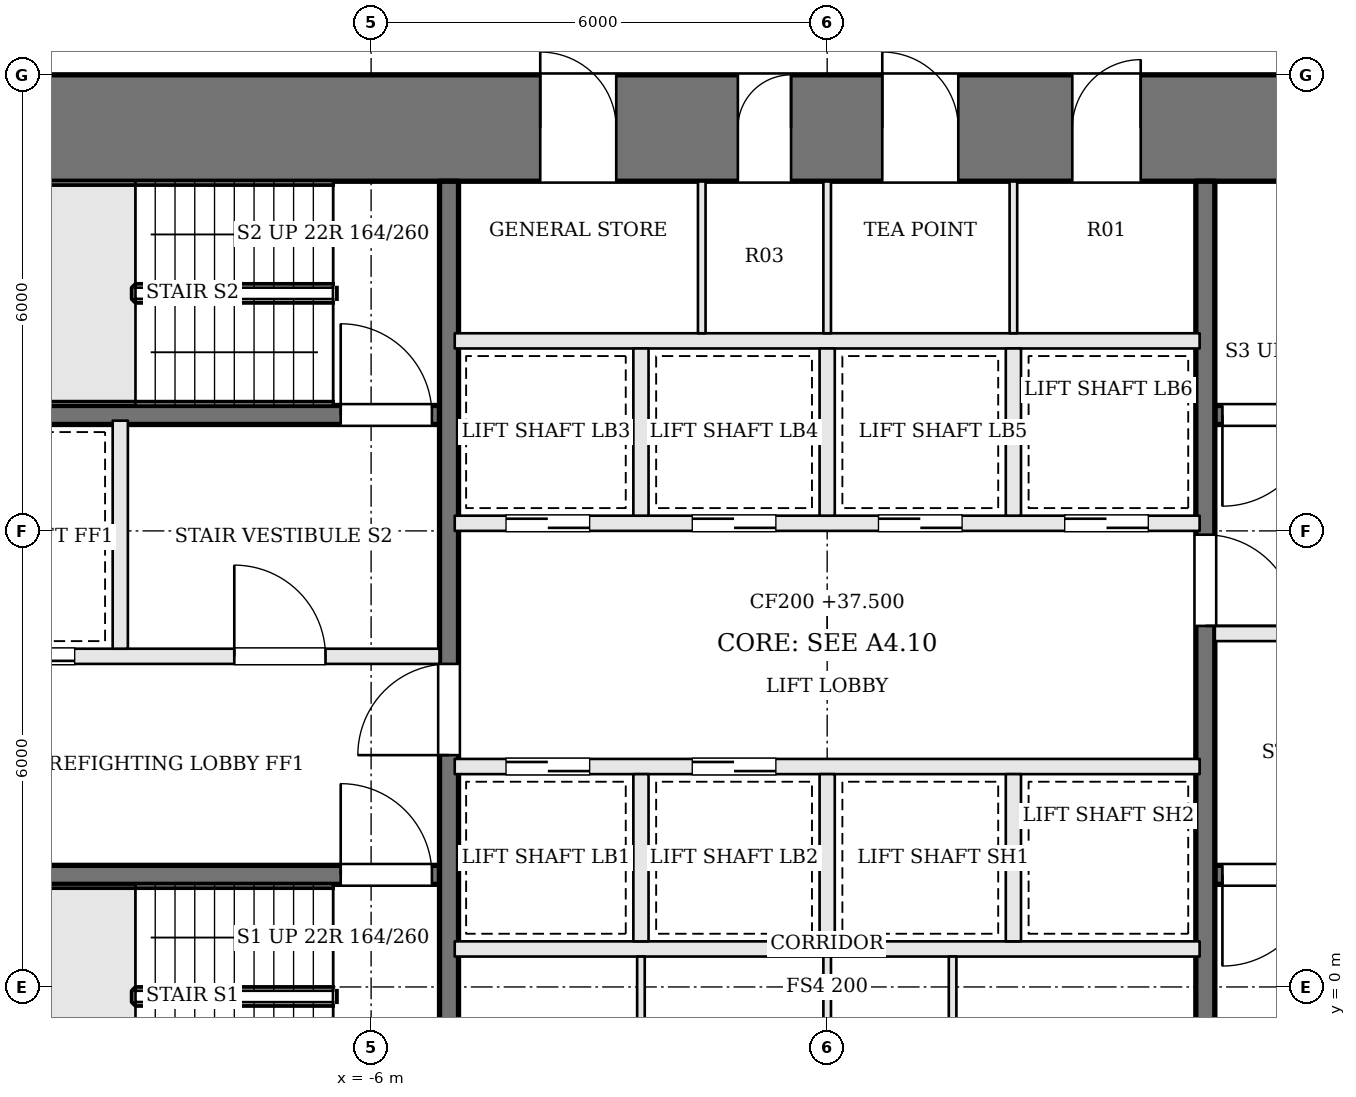
"""IFC4 building model, lengths in metres.
Left out: names, types, materials, properties, quantities, classifications, styles, units other than length and angle.
Written with IfcOpenShell. Run it as: python <this file> out.ifc"""

import sys

from ifc_helpers import new_model, si_unit, direction, frame, frame_2d, origin, place, context, subcontext, project, spatial, rectangle, extrude, element, fill, save


model = new_model("IFC4")
c1 = context("Model", 3, precision=1e-05, world=origin(), true_north=direction((0.0, 1.0)))
c2 = subcontext(c1, "Body", "Model", "MODEL_VIEW")
j1 = project(units=[si_unit("LENGTHUNIT", "METRE"), si_unit("PLANEANGLEUNIT", "RADIAN")], contexts=[c1])
p1 = place(None, origin())
s1 = spatial("IfcSite", under=j1, at=p1, CompositionType="ELEMENT")
p2 = place(p1, origin())
s2 = spatial("IfcBuilding", under=s1, at=p2, CompositionType="ELEMENT")
p3 = place(p2, frame((0.0, 0.0, 37.5)))
s3 = spatial("IfcBuildingStorey", under=s2, at=p3, CompositionType="ELEMENT", Elevation=37.5)
p4 = place(p3, frame((-13.0, 11.3, 0.0), z_axis=(0.0, 0.0, 1.0), x_axis=(1.0, 0.0, 0.0)))
e1 = element("IfcWall", 1, at=p4, inside=s3, PredefinedType="SHEAR", context=c2, shape_type="SweptSolid", body=[
    extrude(rectangle(XDim=26.0, YDim=1.4, at=frame_2d((13.0, 0.0))), origin(), (0.0, 0.0, 1.0), 3.6),
])
p5 = place(p4, frame((9.225, 0.0, 0.0)))
e2 = element("IfcOpeningElement", 2, at=p5, cuts=e1, PredefinedType="OPENING", context=c2, shape_type="SweptSolid", body=[
    extrude(rectangle(XDim=1.0, YDim=2.1, at=frame_2d((0.5, 1.05))), frame((0.0, 0.71, 0.0), z_axis=(0.0, -1.0, 0.0), x_axis=(1.0, 0.0, 0.0)), (0.0, 0.0, 1.0), 1.42),
])
p6 = place(p4, frame((11.825, 0.0, 0.0)))
e3 = element("IfcOpeningElement", 3, at=p6, cuts=e1, PredefinedType="OPENING", context=c2, shape_type="SweptSolid", body=[
    extrude(rectangle(XDim=0.7, YDim=2.1, at=frame_2d((0.35, 1.05))), frame((0.0, 0.71, 0.0), z_axis=(0.0, -1.0, 0.0), x_axis=(1.0, 0.0, 0.0)), (0.0, 0.0, 1.0), 1.42),
])
p7 = place(p4, frame((13.725, 0.0, 0.0)))
e4 = element("IfcOpeningElement", 4, at=p7, cuts=e1, PredefinedType="OPENING", context=c2, shape_type="SweptSolid", body=[
    extrude(rectangle(XDim=1.0, YDim=2.1, at=frame_2d((0.5, 1.05))), frame((0.0, 0.71, 0.0), z_axis=(0.0, -1.0, 0.0), x_axis=(1.0, 0.0, 0.0)), (0.0, 0.0, 1.0), 1.42),
])
p8 = place(p4, frame((16.225, 0.0, 0.0)))
e5 = element("IfcOpeningElement", 5, at=p8, cuts=e1, PredefinedType="OPENING", context=c2, shape_type="SweptSolid", body=[
    extrude(rectangle(XDim=0.9, YDim=2.1, at=frame_2d((0.45, 1.05))), frame((0.0, 0.71, 0.0), z_axis=(0.0, -1.0, 0.0), x_axis=(1.0, 0.0, 0.0)), (0.0, 0.0, 1.0), 1.42),
])
p9 = place(p3, frame((-11.6, 1.475, 0.0), z_axis=(0.0, 0.0, 1.0), x_axis=(1.0, 0.0, 0.0)))
e6 = element("IfcWall", 6, at=p9, inside=s3, PredefinedType="SOLIDWALL", context=c2, shape_type="SweptSolid", body=[
    extrude(rectangle(XDim=6.5, YDim=0.25, at=frame_2d((3.25, 0.0))), origin(), (0.0, 0.0, 1.0), 3.4),
])
p10 = place(p9, frame((5.2, 0.0, 0.0)))
e7 = element("IfcOpeningElement", 7, at=p10, cuts=e6, PredefinedType="OPENING", context=c2, shape_type="SweptSolid", body=[
    extrude(rectangle(XDim=1.2, YDim=2.1, at=frame_2d((0.6, 1.05))), frame((0.0, 0.135, 0.0), z_axis=(0.0, -1.0, 0.0), x_axis=(1.0, 0.0, 0.0)), (0.0, 0.0, 1.0), 0.27),
])
p11 = place(p3, frame((11.6, 7.525, 0.0), z_axis=(0.0, 0.0, 1.0), x_axis=(-1.0, 0.0, 0.0)))
e8 = element("IfcWall", 8, at=p11, inside=s3, PredefinedType="SOLIDWALL", context=c2, shape_type="SweptSolid", body=[
    extrude(rectangle(XDim=6.5, YDim=0.25, at=frame_2d((3.25, 0.0))), origin(), (0.0, 0.0, 1.0), 3.4),
])
p12 = place(p11, frame((5.2, 0.0, 0.0)))
e9 = element("IfcOpeningElement", 9, at=p12, cuts=e8, PredefinedType="OPENING", context=c2, shape_type="SweptSolid", body=[
    extrude(rectangle(XDim=1.2, YDim=2.1, at=frame_2d((0.6, 1.05))), frame((0.0, 0.135, 0.0), z_axis=(0.0, -1.0, 0.0), x_axis=(1.0, 0.0, 0.0)), (0.0, 0.0, 1.0), 0.27),
])
p13 = place(p3, frame((-11.6, 4.35, 0.0), z_axis=(0.0, 0.0, 1.0), x_axis=(1.0, 0.0, 0.0)))
e10 = element("IfcWall", 10, at=p13, inside=s3, PredefinedType="SOLIDWALL", context=c2, shape_type="SweptSolid", body=[
    extrude(rectangle(XDim=6.5, YDim=0.2, at=frame_2d((3.25, 0.0))), origin(), (0.0, 0.0, 1.0), 3.4),
])
p14 = place(p13, frame((3.8, 0.0, 0.0)))
e11 = element("IfcOpeningElement", 11, at=p14, cuts=e10, PredefinedType="OPENING", context=c2, shape_type="SweptSolid", body=[
    extrude(rectangle(XDim=1.2, YDim=2.1, at=frame_2d((0.6, 1.05))), frame((0.0, 0.11, 0.0), z_axis=(0.0, -1.0, 0.0), x_axis=(1.0, 0.0, 0.0)), (0.0, 0.0, 1.0), 0.22),
])
p15 = place(p13, frame((0.5, 0.0, 0.0)))
e12 = element("IfcOpeningElement", 12, at=p15, cuts=e10, PredefinedType="OPENING", context=c2, shape_type="SweptSolid", body=[
    extrude(rectangle(XDim=1.2, YDim=2.1, at=frame_2d((0.6, 1.05))), frame((0.0, 0.11, 0.0), z_axis=(0.0, -1.0, 0.0), x_axis=(1.0, 0.0, 0.0)), (0.0, 0.0, 1.0), 0.22),
])
p16 = place(p3, frame((11.6, 4.65, 0.0), z_axis=(0.0, 0.0, 1.0), x_axis=(-1.0, 0.0, 0.0)))
e13 = element("IfcWall", 13, at=p16, inside=s3, PredefinedType="SOLIDWALL", context=c2, shape_type="SweptSolid", body=[
    extrude(rectangle(XDim=6.5, YDim=0.2, at=frame_2d((3.25, 0.0))), origin(), (0.0, 0.0, 1.0), 3.4),
])
p17 = place(p16, frame((3.8, 0.0, 0.0)))
e14 = element("IfcOpeningElement", 14, at=p17, cuts=e13, PredefinedType="OPENING", context=c2, shape_type="SweptSolid", body=[
    extrude(rectangle(XDim=1.2, YDim=2.1, at=frame_2d((0.6, 1.05))), frame((0.0, 0.11, 0.0), z_axis=(0.0, -1.0, 0.0), x_axis=(1.0, 0.0, 0.0)), (0.0, 0.0, 1.0), 0.22),
])
p18 = place(p16, frame((0.5, 0.0, 0.0)))
e15 = element("IfcOpeningElement", 15, at=p18, cuts=e13, PredefinedType="OPENING", context=c2, shape_type="SweptSolid", body=[
    extrude(rectangle(XDim=1.2, YDim=2.1, at=frame_2d((0.6, 1.05))), frame((0.0, 0.11, 0.0), z_axis=(0.0, -1.0, 0.0), x_axis=(1.0, 0.0, 0.0)), (0.0, 0.0, 1.0), 0.22),
])
p19 = place(p3, frame((-11.6, 7.525, 0.0), z_axis=(0.0, 0.0, 1.0), x_axis=(1.0, 0.0, 0.0)))
e16 = element("IfcWall", 16, at=p19, inside=s3, PredefinedType="SOLIDWALL", context=c2, shape_type="SweptSolid", body=[
    extrude(rectangle(XDim=6.5, YDim=0.25, at=frame_2d((3.25, 0.0))), origin(), (0.0, 0.0, 1.0), 3.4),
])
p20 = place(p19, frame((5.2, 0.0, 0.0)))
e17 = element("IfcOpeningElement", 17, at=p20, cuts=e16, PredefinedType="OPENING", context=c2, shape_type="SweptSolid", body=[
    extrude(rectangle(XDim=1.2, YDim=2.1, at=frame_2d((0.6, 1.05))), frame((0.0, 0.135, 0.0), z_axis=(0.0, -1.0, 0.0), x_axis=(1.0, 0.0, 0.0)), (0.0, 0.0, 1.0), 0.27),
])
p21 = place(p3, frame((11.6, 1.475, 0.0), z_axis=(0.0, 0.0, 1.0), x_axis=(-1.0, 0.0, 0.0)))
e18 = element("IfcWall", 18, at=p21, inside=s3, PredefinedType="SOLIDWALL", context=c2, shape_type="SweptSolid", body=[
    extrude(rectangle(XDim=6.5, YDim=0.25, at=frame_2d((3.25, 0.0))), origin(), (0.0, 0.0, 1.0), 3.4),
])
p22 = place(p21, frame((5.2, 0.0, 0.0)))
e19 = element("IfcOpeningElement", 19, at=p22, cuts=e18, PredefinedType="OPENING", context=c2, shape_type="SweptSolid", body=[
    extrude(rectangle(XDim=1.2, YDim=2.1, at=frame_2d((0.6, 1.05))), frame((0.0, 0.135, 0.0), z_axis=(0.0, -1.0, 0.0), x_axis=(1.0, 0.0, 0.0)), (0.0, 0.0, 1.0), 0.27),
])
p23 = place(p3, frame((-9.3, 4.45, 0.0), z_axis=(0.0, 0.0, 1.0), x_axis=(0.0, 1.0, 0.0)))
e20 = element("IfcWall", 20, at=p23, inside=s3, PredefinedType="SOLIDWALL", context=c2, shape_type="SweptSolid", body=[
    extrude(rectangle(XDim=3.0, YDim=0.2, at=frame_2d((1.5, 0.0))), origin(), (0.0, 0.0, 1.0), 3.4),
])
p24 = place(p3, frame((-4.975, -1.6, 0.0), z_axis=(0.0, 0.0, 1.0), x_axis=(0.0, 1.0, 0.0)))
e21 = element("IfcWall", 21, at=p24, inside=s3, PredefinedType="SOLIDWALL", context=c2, shape_type="SweptSolid", body=[
    extrude(rectangle(XDim=12.2, YDim=0.25, at=frame_2d((6.1, 0.0))), origin(), (0.0, 0.0, 1.0), 3.4),
])
p25 = place(p24, frame((4.65, 0.0, 0.0)))
e22 = element("IfcOpeningElement", 22, at=p25, cuts=e21, PredefinedType="OPENING", context=c2, shape_type="SweptSolid", body=[
    extrude(rectangle(XDim=1.2, YDim=2.1, at=frame_2d((0.6, 1.05))), frame((0.0, 0.135, 0.0), z_axis=(0.0, -1.0, 0.0), x_axis=(1.0, 0.0, 0.0)), (0.0, 0.0, 1.0), 0.27),
])
p26 = place(p3, frame((4.975, 10.6, 0.0), z_axis=(0.0, 0.0, 1.0), x_axis=(0.0, -1.0, 0.0)))
e23 = element("IfcWall", 23, at=p26, inside=s3, PredefinedType="SOLIDWALL", context=c2, shape_type="SweptSolid", body=[
    extrude(rectangle(XDim=12.2, YDim=0.25, at=frame_2d((6.1, 0.0))), origin(), (0.0, 0.0, 1.0), 3.4),
])
p27 = place(p26, frame((4.65, 0.0, 0.0)))
e24 = element("IfcOpeningElement", 24, at=p27, cuts=e23, PredefinedType="OPENING", context=c2, shape_type="SweptSolid", body=[
    extrude(rectangle(XDim=1.2, YDim=2.1, at=frame_2d((0.6, 1.05))), frame((0.0, 0.135, 0.0), z_axis=(0.0, -1.0, 0.0), x_axis=(1.0, 0.0, 0.0)), (0.0, 0.0, 1.0), 0.27),
])
p28 = place(p3, frame((-4.9, 0.5, 0.0), z_axis=(0.0, 0.0, 1.0), x_axis=(1.0, 0.0, 0.0)))
e25 = element("IfcWall", 25, at=p28, inside=s3, PredefinedType="SOLIDWALL", context=c2, shape_type="SweptSolid", body=[
    extrude(rectangle(XDim=9.8, YDim=0.2, at=frame_2d((4.9, 0.0))), origin(), (0.0, 0.0, 1.0), 3.4),
])
p29 = place(p3, frame((-4.9, 2.9, 0.0), z_axis=(0.0, 0.0, 1.0), x_axis=(1.0, 0.0, 0.0)))
e26 = element("IfcWall", 26, at=p29, inside=s3, PredefinedType="SOLIDWALL", context=c2, shape_type="SweptSolid", body=[
    extrude(rectangle(XDim=9.8, YDim=0.2, at=frame_2d((4.9, 0.0))), origin(), (0.0, 0.0, 1.0), 3.4),
])
p30 = place(p29, frame((0.675, 0.0, 0.0)))
e27 = element("IfcOpeningElement", 27, at=p30, cuts=e26, PredefinedType="OPENING", context=c2, shape_type="SweptSolid", body=[
    extrude(rectangle(XDim=1.1, YDim=2.1, at=frame_2d((0.55, 1.05))), frame((0.0, 0.11, 0.0), z_axis=(0.0, -1.0, 0.0), x_axis=(1.0, 0.0, 0.0)), (0.0, 0.0, 1.0), 0.22),
])
p31 = place(p29, frame((3.125, 0.0, 0.0)))
e28 = element("IfcOpeningElement", 28, at=p31, cuts=e26, PredefinedType="OPENING", context=c2, shape_type="SweptSolid", body=[
    extrude(rectangle(XDim=1.1, YDim=2.1, at=frame_2d((0.55, 1.05))), frame((0.0, 0.11, 0.0), z_axis=(0.0, -1.0, 0.0), x_axis=(1.0, 0.0, 0.0)), (0.0, 0.0, 1.0), 0.22),
])
p32 = place(p3, frame((-4.9, 6.1, 0.0), z_axis=(0.0, 0.0, 1.0), x_axis=(1.0, 0.0, 0.0)))
e29 = element("IfcWall", 29, at=p32, inside=s3, PredefinedType="SOLIDWALL", context=c2, shape_type="SweptSolid", body=[
    extrude(rectangle(XDim=9.8, YDim=0.2, at=frame_2d((4.9, 0.0))), origin(), (0.0, 0.0, 1.0), 3.4),
])
p33 = place(p32, frame((0.675, 0.0, 0.0)))
e30 = element("IfcOpeningElement", 30, at=p33, cuts=e29, PredefinedType="OPENING", context=c2, shape_type="SweptSolid", body=[
    extrude(rectangle(XDim=1.1, YDim=2.1, at=frame_2d((0.55, 1.05))), frame((0.0, 0.11, 0.0), z_axis=(0.0, -1.0, 0.0), x_axis=(1.0, 0.0, 0.0)), (0.0, 0.0, 1.0), 0.22),
])
p34 = place(p32, frame((3.125, 0.0, 0.0)))
e31 = element("IfcOpeningElement", 31, at=p34, cuts=e29, PredefinedType="OPENING", context=c2, shape_type="SweptSolid", body=[
    extrude(rectangle(XDim=1.1, YDim=2.1, at=frame_2d((0.55, 1.05))), frame((0.0, 0.11, 0.0), z_axis=(0.0, -1.0, 0.0), x_axis=(1.0, 0.0, 0.0)), (0.0, 0.0, 1.0), 0.22),
])
p35 = place(p32, frame((5.575, 0.0, 0.0)))
e32 = element("IfcOpeningElement", 32, at=p35, cuts=e29, PredefinedType="OPENING", context=c2, shape_type="SweptSolid", body=[
    extrude(rectangle(XDim=1.1, YDim=2.1, at=frame_2d((0.55, 1.05))), frame((0.0, 0.11, 0.0), z_axis=(0.0, -1.0, 0.0), x_axis=(1.0, 0.0, 0.0)), (0.0, 0.0, 1.0), 0.22),
])
p36 = place(p32, frame((8.025, 0.0, 0.0)))
e33 = element("IfcOpeningElement", 33, at=p36, cuts=e29, PredefinedType="OPENING", context=c2, shape_type="SweptSolid", body=[
    extrude(rectangle(XDim=1.1, YDim=2.1, at=frame_2d((0.55, 1.05))), frame((0.0, 0.11, 0.0), z_axis=(0.0, -1.0, 0.0), x_axis=(1.0, 0.0, 0.0)), (0.0, 0.0, 1.0), 0.22),
])
p37 = place(p3, frame((-4.9, 8.5, 0.0), z_axis=(0.0, 0.0, 1.0), x_axis=(1.0, 0.0, 0.0)))
e34 = element("IfcWall", 34, at=p37, inside=s3, PredefinedType="SOLIDWALL", context=c2, shape_type="SweptSolid", body=[
    extrude(rectangle(XDim=9.8, YDim=0.2, at=frame_2d((4.9, 0.0))), origin(), (0.0, 0.0, 1.0), 3.4),
])
for number, where, z_axis, x_axis in (
    (35, (-2.45, 0.6, 0.0), (0.0, 0.0, 1.0), (0.0, 1.0, 0.0)),
    (36, (0.0, 0.6, 0.0), (0.0, 0.0, 1.0), (0.0, 1.0, 0.0)),
    (37, (2.45, 0.6, 0.0), (0.0, 0.0, 1.0), (0.0, 1.0, 0.0)),
    (38, (-2.45, 6.2, 0.0), (0.0, 0.0, 1.0), (0.0, 1.0, 0.0)),
    (39, (0.0, 6.2, 0.0), (0.0, 0.0, 1.0), (0.0, 1.0, 0.0)),
    (40, (2.45, 6.2, 0.0), (0.0, 0.0, 1.0), (0.0, 1.0, 0.0)),
):
    element("IfcWall", number, at=place(p3, frame(where, z_axis=z_axis, x_axis=x_axis)), inside=s3, PredefinedType="SOLIDWALL", context=c2, shape_type="SweptSolid", body=[
        extrude(rectangle(XDim=2.2, YDim=0.2, at=frame_2d((1.1, 0.0))), origin(), (0.0, 0.0, 1.0), 3.4),
    ])
for number, where, z_axis, x_axis in (
    (41, (-2.45, -1.6, 0.0), (0.0, 0.0, 1.0), (0.0, 1.0, 0.0)),
    (42, (0.0, -1.6, 0.0), (0.0, 0.0, 1.0), (0.0, 1.0, 0.0)),
    (43, (1.65, -1.6, 0.0), (0.0, 0.0, 1.0), (0.0, 1.0, 0.0)),
    (44, (-1.65, 8.6, 0.0), (0.0, 0.0, 1.0), (0.0, 1.0, 0.0)),
    (45, (0.0, 8.6, 0.0), (0.0, 0.0, 1.0), (0.0, 1.0, 0.0)),
    (46, (2.45, 8.6, 0.0), (0.0, 0.0, 1.0), (0.0, 1.0, 0.0)),
):
    element("IfcWall", number, at=place(p3, frame(where, z_axis=z_axis, x_axis=x_axis)), inside=s3, PredefinedType="PARTITIONING", context=c2, shape_type="SweptSolid", body=[
        extrude(rectangle(XDim=2.0, YDim=0.1, at=frame_2d((1.0, 0.0))), origin(), (0.0, 0.0, 1.0), 3.4),
    ])
p38 = place(p25, origin())
e47 = element("IfcDoor", 47, at=p38, inside=s3, OperationType="SINGLE_SWING_LEFT", PredefinedType="DOOR", context=c2, shape_type="SweptSolid", body=[
    extrude(rectangle(XDim=1.2, YDim=2.1, at=frame_2d((0.6, 1.05))), frame((0.0, 0.025, 0.0), z_axis=(0.0, -1.0, 0.0), x_axis=(1.0, 0.0, 0.0)), (0.0, 0.0, 1.0), 0.05),
])
fill(e22, e47)
p39 = place(p27, origin())
e48 = element("IfcDoor", 48, at=p39, inside=s3, OperationType="SINGLE_SWING_RIGHT", PredefinedType="DOOR", context=c2, shape_type="SweptSolid", body=[
    extrude(rectangle(XDim=1.2, YDim=2.1, at=frame_2d((0.6, 1.05))), frame((0.0, 0.025, 0.0), z_axis=(0.0, -1.0, 0.0), x_axis=(1.0, 0.0, 0.0)), (0.0, 0.0, 1.0), 0.05),
])
fill(e24, e48)
p40 = place(p14, origin())
e49 = element("IfcDoor", 49, at=p40, inside=s3, OperationType="SINGLE_SWING_LEFT", PredefinedType="DOOR", context=c2, shape_type="SweptSolid", body=[
    extrude(rectangle(XDim=1.2, YDim=2.1, at=frame_2d((0.6, 1.05))), frame((0.0, 0.025, 0.0), z_axis=(0.0, -1.0, 0.0), x_axis=(1.0, 0.0, 0.0)), (0.0, 0.0, 1.0), 0.05),
])
fill(e11, e49)
p41 = place(p10, origin())
e50 = element("IfcDoor", 50, at=p41, inside=s3, OperationType="SINGLE_SWING_LEFT", PredefinedType="DOOR", context=c2, shape_type="SweptSolid", body=[
    extrude(rectangle(XDim=1.2, YDim=2.1, at=frame_2d((0.6, 1.05))), frame((0.0, 0.025, 0.0), z_axis=(0.0, -1.0, 0.0), x_axis=(1.0, 0.0, 0.0)), (0.0, 0.0, 1.0), 0.05),
])
fill(e7, e50)
p42 = place(p12, origin())
e51 = element("IfcDoor", 51, at=p42, inside=s3, OperationType="SINGLE_SWING_RIGHT", PredefinedType="DOOR", context=c2, shape_type="SweptSolid", body=[
    extrude(rectangle(XDim=1.2, YDim=2.1, at=frame_2d((0.6, 1.05))), frame((0.0, 0.025, 0.0), z_axis=(0.0, -1.0, 0.0), x_axis=(1.0, 0.0, 0.0)), (0.0, 0.0, 1.0), 0.05),
])
fill(e9, e51)
p43 = place(p20, origin())
e52 = element("IfcDoor", 52, at=p43, inside=s3, OperationType="SINGLE_SWING_LEFT", PredefinedType="DOOR", context=c2, shape_type="SweptSolid", body=[
    extrude(rectangle(XDim=1.2, YDim=2.1, at=frame_2d((0.6, 1.05))), frame((0.0, 0.025, 0.0), z_axis=(0.0, -1.0, 0.0), x_axis=(1.0, 0.0, 0.0)), (0.0, 0.0, 1.0), 0.05),
])
fill(e17, e52)
p44 = place(p22, origin())
e53 = element("IfcDoor", 53, at=p44, inside=s3, OperationType="SINGLE_SWING_RIGHT", PredefinedType="DOOR", context=c2, shape_type="SweptSolid", body=[
    extrude(rectangle(XDim=1.2, YDim=2.1, at=frame_2d((0.6, 1.05))), frame((0.0, 0.025, 0.0), z_axis=(0.0, -1.0, 0.0), x_axis=(1.0, 0.0, 0.0)), (0.0, 0.0, 1.0), 0.05),
])
fill(e19, e53)
p45 = place(p15, origin())
e54 = element("IfcDoor", 54, at=p45, inside=s3, OperationType="SLIDING_TO_RIGHT", PredefinedType="DOOR", context=c2, shape_type="SweptSolid", body=[
    extrude(rectangle(XDim=1.2, YDim=2.1, at=frame_2d((0.6, 1.05))), frame((0.0, 0.025, 0.0), z_axis=(0.0, -1.0, 0.0), x_axis=(1.0, 0.0, 0.0)), (0.0, 0.0, 1.0), 0.05),
])
fill(e12, e54)
p46 = place(p30, origin())
e55 = element("IfcDoor", 55, at=p46, inside=s3, OperationType="SLIDING_TO_RIGHT", PredefinedType="DOOR", context=c2, shape_type="SweptSolid", body=[
    extrude(rectangle(XDim=1.1, YDim=2.1, at=frame_2d((0.55, 1.05))), frame((0.0, 0.025, 0.0), z_axis=(0.0, -1.0, 0.0), x_axis=(1.0, 0.0, 0.0)), (0.0, 0.0, 1.0), 0.05),
])
fill(e27, e55)
p47 = place(p31, origin())
e56 = element("IfcDoor", 56, at=p47, inside=s3, OperationType="SLIDING_TO_LEFT", PredefinedType="DOOR", context=c2, shape_type="SweptSolid", body=[
    extrude(rectangle(XDim=1.1, YDim=2.1, at=frame_2d((0.55, 1.05))), frame((0.0, 0.025, 0.0), z_axis=(0.0, -1.0, 0.0), x_axis=(1.0, 0.0, 0.0)), (0.0, 0.0, 1.0), 0.05),
])
fill(e28, e56)
p48 = place(p33, origin())
e57 = element("IfcDoor", 57, at=p48, inside=s3, OperationType="SLIDING_TO_RIGHT", PredefinedType="DOOR", context=c2, shape_type="SweptSolid", body=[
    extrude(rectangle(XDim=1.1, YDim=2.1, at=frame_2d((0.55, 1.05))), frame((0.0, 0.025, 0.0), z_axis=(0.0, -1.0, 0.0), x_axis=(1.0, 0.0, 0.0)), (0.0, 0.0, 1.0), 0.05),
])
fill(e30, e57)
p49 = place(p34, origin())
e58 = element("IfcDoor", 58, at=p49, inside=s3, OperationType="SLIDING_TO_LEFT", PredefinedType="DOOR", context=c2, shape_type="SweptSolid", body=[
    extrude(rectangle(XDim=1.1, YDim=2.1, at=frame_2d((0.55, 1.05))), frame((0.0, 0.025, 0.0), z_axis=(0.0, -1.0, 0.0), x_axis=(1.0, 0.0, 0.0)), (0.0, 0.0, 1.0), 0.05),
])
fill(e31, e58)
p50 = place(p35, origin())
e59 = element("IfcDoor", 59, at=p50, inside=s3, OperationType="SLIDING_TO_RIGHT", PredefinedType="DOOR", context=c2, shape_type="SweptSolid", body=[
    extrude(rectangle(XDim=1.1, YDim=2.1, at=frame_2d((0.55, 1.05))), frame((0.0, 0.025, 0.0), z_axis=(0.0, -1.0, 0.0), x_axis=(1.0, 0.0, 0.0)), (0.0, 0.0, 1.0), 0.05),
])
fill(e32, e59)
p51 = place(p36, origin())
e60 = element("IfcDoor", 60, at=p51, inside=s3, OperationType="SLIDING_TO_LEFT", PredefinedType="DOOR", context=c2, shape_type="SweptSolid", body=[
    extrude(rectangle(XDim=1.1, YDim=2.1, at=frame_2d((0.55, 1.05))), frame((0.0, 0.025, 0.0), z_axis=(0.0, -1.0, 0.0), x_axis=(1.0, 0.0, 0.0)), (0.0, 0.0, 1.0), 0.05),
])
fill(e33, e60)
p52 = place(p5, origin())
e61 = element("IfcDoor", 61, at=p52, inside=s3, OperationType="SINGLE_SWING_LEFT", PredefinedType="DOOR", context=c2, shape_type="SweptSolid", body=[
    extrude(rectangle(XDim=1.0, YDim=2.1, at=frame_2d((0.5, 1.05))), frame((0.0, 0.025, 0.0), z_axis=(0.0, -1.0, 0.0), x_axis=(1.0, 0.0, 0.0)), (0.0, 0.0, 1.0), 0.05),
])
fill(e2, e61)
p53 = place(p6, origin())
e62 = element("IfcDoor", 62, at=p53, inside=s3, OperationType="SINGLE_SWING_RIGHT", PredefinedType="DOOR", context=c2, shape_type="SweptSolid", body=[
    extrude(rectangle(XDim=0.7, YDim=2.1, at=frame_2d((0.35, 1.05))), frame((0.0, 0.025, 0.0), z_axis=(0.0, -1.0, 0.0), x_axis=(1.0, 0.0, 0.0)), (0.0, 0.0, 1.0), 0.05),
])
fill(e3, e62)
p54 = place(p7, origin())
e63 = element("IfcDoor", 63, at=p54, inside=s3, OperationType="SINGLE_SWING_LEFT", PredefinedType="DOOR", context=c2, shape_type="SweptSolid", body=[
    extrude(rectangle(XDim=1.0, YDim=2.1, at=frame_2d((0.5, 1.05))), frame((0.0, 0.025, 0.0), z_axis=(0.0, -1.0, 0.0), x_axis=(1.0, 0.0, 0.0)), (0.0, 0.0, 1.0), 0.05),
])
fill(e4, e63)
p55 = place(p8, origin())
e64 = element("IfcDoor", 64, at=p55, inside=s3, OperationType="SINGLE_SWING_RIGHT", PredefinedType="DOOR", context=c2, shape_type="SweptSolid", body=[
    extrude(rectangle(XDim=0.9, YDim=2.1, at=frame_2d((0.45, 1.05))), frame((0.0, 0.025, 0.0), z_axis=(0.0, -1.0, 0.0), x_axis=(1.0, 0.0, 0.0)), (0.0, 0.0, 1.0), 0.05),
])
fill(e5, e64)
save(model, sys.argv[1])
